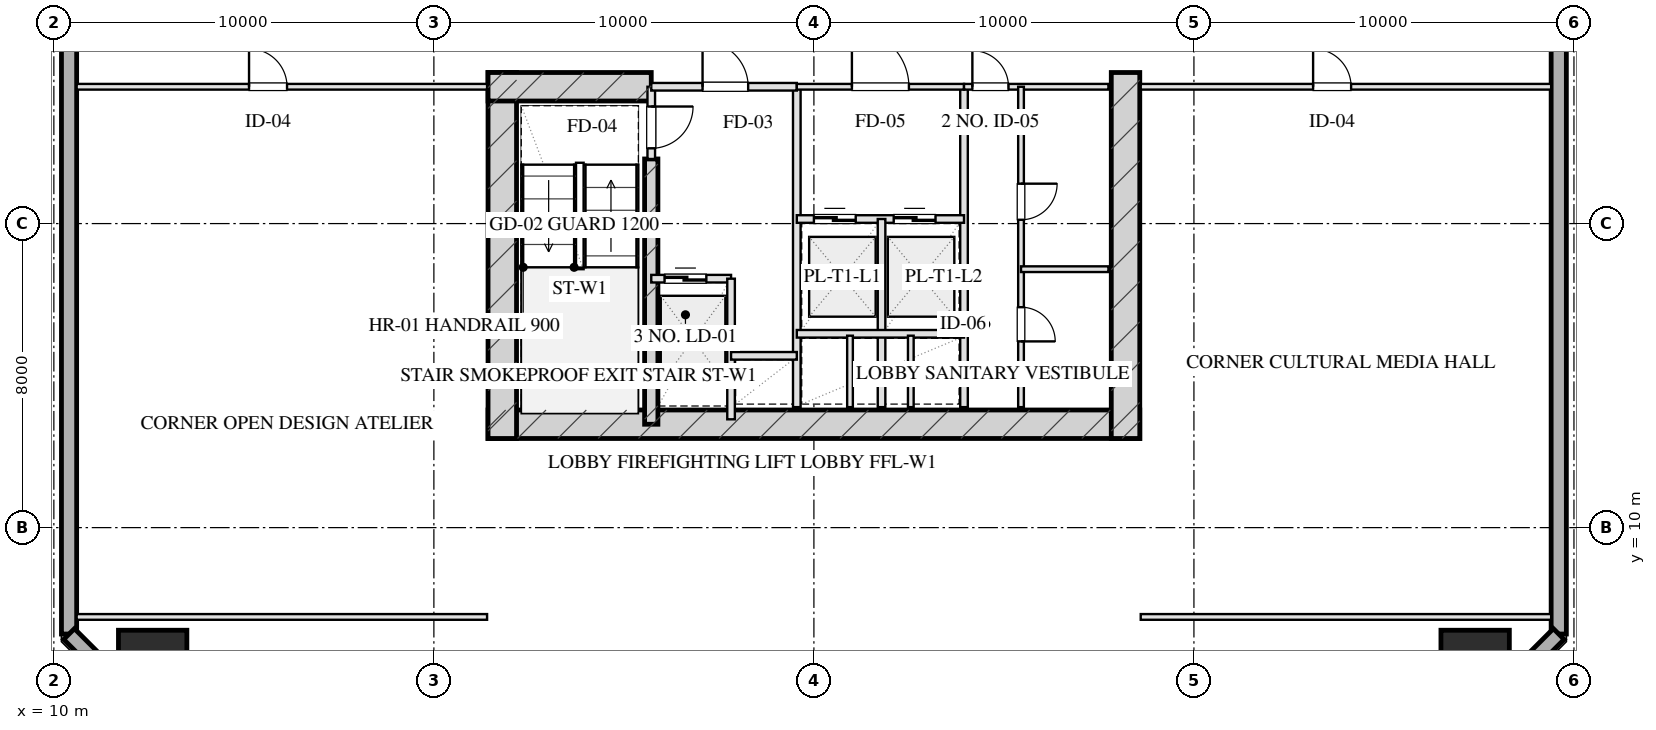
"""IFC4 building model, lengths in metres.
Left out: names, types, materials, properties, quantities, classifications, styles, units other than length and angle.
Written with IfcOpenShell. Run it as: python <this file> out.ifc"""

import sys

from ifc_helpers import new_model, si_unit, direction, frame, frame_2d, origin, origin_2d, place, context, subcontext, project, spatial, rectangle, hollow_rectangle, extrude, element, fill, save


model = new_model("IFC4")
c1 = context("Model", 3, precision=1e-05, world=origin(), true_north=direction((0.0, 1.0)))
c2 = subcontext(c1, "Body", "Model", "MODEL_VIEW")
j1 = project(units=[si_unit("LENGTHUNIT", "METRE"), si_unit("PLANEANGLEUNIT", "RADIAN")], contexts=[c1])
p1 = place(None, origin())
s1 = spatial("IfcSite", under=j1, at=p1, CompositionType="ELEMENT")
p2 = place(p1, origin())
s2 = spatial("IfcBuilding", under=s1, at=p2, CompositionType="ELEMENT")
p3 = place(p2, frame((0.0, 0.0, 74.75)))
s3 = spatial("IfcBuildingStorey", under=s2, at=p3, CompositionType="ELEMENT", Elevation=74.75)
p4 = place(p3, frame((21.425, 12.72, 0.0), z_axis=(0.0, 0.0, 1.0), x_axis=(1.0, 0.0, 0.0)))
e1 = element("IfcWall", 1, at=p4, inside=s3, PredefinedType="SHEAR", context=c2, shape_type="SweptSolid", body=[
    extrude(rectangle(XDim=17.15, YDim=0.75, at=frame_2d((8.575, 0.0))), origin(), (0.0, 0.0, 1.0), 3.45),
])
for number, where, z_axis, x_axis in (
    (2, (21.8, 21.975, 0.0), (0.0, 0.0, 1.0), (0.0, -1.0, 0.0)),
    (3, (38.2, 21.975, 0.0), (0.0, 0.0, 1.0), (0.0, -1.0, 0.0)),
):
    element("IfcWall", number, at=place(p3, frame(where, z_axis=z_axis, x_axis=x_axis)), inside=s3, PredefinedType="SHEAR", context=c2, shape_type="SweptSolid", body=[
        extrude(rectangle(XDim=9.63, YDim=0.75, at=frame_2d((4.815, 0.0))), origin(), (0.0, 0.0, 1.0), 3.45),
    ])
p5 = place(p3, frame((25.72, 19.7, 0.0), z_axis=(0.0, 0.0, 1.0), x_axis=(0.0, -1.0, 0.0)))
e4 = element("IfcWall", 4, at=p5, inside=s3, PredefinedType="SHEAR", context=c2, shape_type="SweptSolid", body=[
    extrude(rectangle(XDim=6.98, YDim=0.35, at=frame_2d((3.49, 0.0))), origin(), (0.0, 0.0, 1.0), 3.45),
])
p6 = place(p3, frame((21.425, 21.6, 0.0), z_axis=(0.0, 0.0, 1.0), x_axis=(1.0, 0.0, 0.0)))
e5 = element("IfcWall", 5, at=p6, inside=s3, PredefinedType="SHEAR", context=c2, shape_type="SweptSolid", body=[
    extrude(rectangle(XDim=4.295, YDim=0.75, at=frame_2d((2.147, 0.0))), origin(), (0.0, 0.0, 1.0), 3.45),
])
for number, where, z_axis, x_axis in (
    (6, (12.6, 6.4, 0.0), (0.0, 0.0, 1.0), (1.0, 0.0, 0.0)),
    (7, (47.4, 6.4, 0.0), (0.0, 0.0, 1.0), (1.0, 0.0, 0.0)),
):
    element("IfcColumn", number, at=place(p3, frame(where, z_axis=z_axis, x_axis=x_axis)), inside=s3, PredefinedType="COLUMN", context=c2, shape_type="SweptSolid", body=[
        extrude(hollow_rectangle(XDim=1.8, YDim=1.8, WallThickness=0.06, at=origin_2d()), origin(), (0.0, 0.0, 1.0), 3.451),
    ])
p7 = place(p3, frame((10.4, 7.2, 0.0), z_axis=(0.0, 0.0, 1.0), x_axis=(0.0, 1.0, 0.0)))
e8 = element("IfcWall", 8, at=p7, inside=s3, PredefinedType="SOLIDWALL", context=c2, shape_type="SweptSolid", body=[
    extrude(rectangle(XDim=53.6, YDim=0.4, at=frame_2d((26.8, 0.0))), origin(), (0.0, 0.0, 1.0), 2.61),
])
p8 = place(p7, frame((19.15, 0.0, 0.75)))
e9 = element("IfcOpeningElement", 9, at=p8, cuts=e8, PredefinedType="OPENING", context=c2, shape_type="SweptSolid", body=[
    extrude(rectangle(XDim=2.5, YDim=1.46, at=frame_2d((1.25, 0.73))), frame((0.0, 0.21, 0.0), z_axis=(0.0, -1.0, 0.0), x_axis=(1.0, 0.0, 0.0)), (0.0, 0.0, 1.0), 0.42),
])
p9 = place(p7, frame((28.15, 0.0, 0.75)))
e10 = element("IfcOpeningElement", 10, at=p9, cuts=e8, PredefinedType="OPENING", context=c2, shape_type="SweptSolid", body=[
    extrude(rectangle(XDim=2.5, YDim=1.46, at=frame_2d((1.25, 0.73))), frame((0.0, 0.21, 0.0), z_axis=(0.0, -1.0, 0.0), x_axis=(1.0, 0.0, 0.0)), (0.0, 0.0, 1.0), 0.42),
])
p10 = place(p7, frame((31.95, 0.0, 0.75)))
e11 = element("IfcOpeningElement", 11, at=p10, cuts=e8, PredefinedType="OPENING", context=c2, shape_type="SweptSolid", body=[
    extrude(rectangle(XDim=2.5, YDim=1.46, at=frame_2d((1.25, 0.73))), frame((0.0, 0.21, 0.0), z_axis=(0.0, -1.0, 0.0), x_axis=(1.0, 0.0, 0.0)), (0.0, 0.0, 1.0), 0.42),
])
p11 = place(p3, frame((49.6, 60.8, 0.0), z_axis=(0.0, 0.0, 1.0), x_axis=(0.0, -1.0, 0.0)))
e12 = element("IfcWall", 12, at=p11, inside=s3, PredefinedType="SOLIDWALL", context=c2, shape_type="SweptSolid", body=[
    extrude(rectangle(XDim=53.6, YDim=0.4, at=frame_2d((26.8, 0.0))), origin(), (0.0, 0.0, 1.0), 2.61),
])
for number, where, z_axis, x_axis in (
    (13, (49.6, 7.2, 0.0), (0.0, 0.0, 1.0), (-0.707, -0.707, 0.0)),
    (14, (13.4, 4.2, 0.0), (0.0, 0.0, 1.0), (-0.707, 0.707, 0.0)),
):
    element("IfcWall", number, at=place(p3, frame(where, z_axis=z_axis, x_axis=x_axis)), inside=s3, PredefinedType="SOLIDWALL", context=c2, shape_type="SweptSolid", body=[
        extrude(rectangle(XDim=4.243, YDim=0.4, at=frame_2d((2.121, 0.0))), origin(), (0.0, 0.0, 1.0), 2.61),
    ])
p12 = place(p3, frame((25.72, 21.6, 0.0), z_axis=(0.0, 0.0, 1.0), x_axis=(0.0, -1.0, 0.0)))
e15 = element("IfcWall", 15, at=p12, inside=s3, PredefinedType="PARTITIONING", context=c2, shape_type="SweptSolid", body=[
    extrude(rectangle(XDim=1.9, YDim=0.2, at=frame_2d((0.95, 0.0))), origin(), (0.0, 0.0, 1.0), 3.175),
])
p13 = place(p12, frame((0.52, 0.0, 0.0)))
e16 = element("IfcOpeningElement", 16, at=p13, cuts=e15, PredefinedType="OPENING", context=c2, shape_type="SweptSolid", body=[
    extrude(rectangle(XDim=1.1, YDim=2.05, at=frame_2d((0.55, 1.025))), frame((0.0, 0.11, 0.0), z_axis=(0.0, -1.0, 0.0), x_axis=(1.0, 0.0, 0.0)), (0.0, 0.0, 1.0), 0.22),
])
p14 = place(p3, frame((29.55, 21.6, 0.0), z_axis=(0.0, 0.0, 1.0), x_axis=(0.0, -1.0, 0.0)))
e17 = element("IfcWall", 17, at=p14, inside=s3, PredefinedType="PARTITIONING", context=c2, shape_type="SweptSolid", body=[
    extrude(rectangle(XDim=8.43, YDim=0.2, at=frame_2d((4.215, 0.0))), origin(), (0.0, 0.0, 1.0), 3.175),
])
p15 = place(p3, frame((25.72, 21.6, 0.0), z_axis=(0.0, 0.0, 1.0), x_axis=(1.0, 0.0, 0.0)))
e18 = element("IfcWall", 18, at=p15, inside=s3, PredefinedType="PARTITIONING", context=c2, shape_type="SweptSolid", body=[
    extrude(rectangle(XDim=3.83, YDim=0.2, at=frame_2d((1.915, 0.0))), origin(), (0.0, 0.0, 1.0), 3.175),
])
p16 = place(p15, frame((1.35, 0.0, 0.0)))
e19 = element("IfcOpeningElement", 19, at=p16, cuts=e18, PredefinedType="OPENING", context=c2, shape_type="SweptSolid", body=[
    extrude(rectangle(XDim=1.2, YDim=2.05, at=frame_2d((0.6, 1.025))), frame((0.0, 0.11, 0.0), z_axis=(0.0, -1.0, 0.0), x_axis=(1.0, 0.0, 0.0)), (0.0, 0.0, 1.0), 0.22),
])
p17 = place(p3, frame((25.72, 16.55, 0.0), z_axis=(0.0, 0.0, 1.0), x_axis=(1.0, 0.0, 0.0)))
e20 = element("IfcWall", 20, at=p17, inside=s3, PredefinedType="PARTITIONING", context=c2, shape_type="SweptSolid", body=[
    extrude(rectangle(XDim=2.1, YDim=0.2, at=frame_2d((1.05, 0.0))), origin(), (0.0, 0.0, 1.0), 3.175),
])
p18 = place(p17, frame((0.35, 0.0, 0.0)))
e21 = element("IfcOpeningElement", 21, at=p18, cuts=e20, PredefinedType="OPENING", context=c2, shape_type="SweptSolid", body=[
    extrude(rectangle(XDim=1.1, YDim=2.05, at=frame_2d((0.55, 1.025))), frame((0.0, 0.11, 0.0), z_axis=(0.0, -1.0, 0.0), x_axis=(1.0, 0.0, 0.0)), (0.0, 0.0, 1.0), 0.22),
])
p19 = place(p3, frame((27.82, 16.55, 0.0), z_axis=(0.0, 0.0, 1.0), x_axis=(0.0, -1.0, 0.0)))
e22 = element("IfcWall", 22, at=p19, inside=s3, PredefinedType="PARTITIONING", context=c2, shape_type="SweptSolid", body=[
    extrude(rectangle(XDim=3.7, YDim=0.2, at=frame_2d((1.85, 0.0))), origin(), (0.0, 0.0, 1.0), 3.175),
])
p20 = place(p3, frame((27.82, 14.52, 0.0), z_axis=(0.0, 0.0, 1.0), x_axis=(1.0, 0.0, 0.0)))
e23 = element("IfcWall", 23, at=p20, inside=s3, PredefinedType="PARTITIONING", context=c2, shape_type="SweptSolid", body=[
    extrude(rectangle(XDim=1.73, YDim=0.2, at=frame_2d((0.865, 0.0))), origin(), (0.0, 0.0, 1.0), 3.175),
])
p21 = place(p3, frame((33.95, 21.6, 0.0), z_axis=(0.0, 0.0, 1.0), x_axis=(0.0, -1.0, 0.0)))
e24 = element("IfcWall", 24, at=p21, inside=s3, PredefinedType="PARTITIONING", context=c2, shape_type="SweptSolid", body=[
    extrude(rectangle(XDim=8.43, YDim=0.2, at=frame_2d((4.215, 0.0))), origin(), (0.0, 0.0, 1.0), 3.175),
])
p22 = place(p3, frame((29.55, 21.6, 0.0), z_axis=(0.0, 0.0, 1.0), x_axis=(1.0, 0.0, 0.0)))
e25 = element("IfcWall", 25, at=p22, inside=s3, PredefinedType="PARTITIONING", context=c2, shape_type="SweptSolid", body=[
    extrude(rectangle(XDim=4.4, YDim=0.15, at=frame_2d((2.2, 0.0))), origin(), (0.0, 0.0, 1.0), 3.175),
])
p23 = place(p22, frame((1.45, 0.0, 0.0)))
e26 = element("IfcOpeningElement", 26, at=p23, cuts=e25, PredefinedType="OPENING", context=c2, shape_type="SweptSolid", body=[
    extrude(rectangle(XDim=1.5, YDim=2.05, at=frame_2d((0.75, 1.025))), frame((0.0, 0.085, 0.0), z_axis=(0.0, -1.0, 0.0), x_axis=(1.0, 0.0, 0.0)), (0.0, 0.0, 1.0), 0.17),
])
p24 = place(p3, frame((29.55, 18.12, 0.0), z_axis=(0.0, 0.0, 1.0), x_axis=(1.0, 0.0, 0.0)))
e27 = element("IfcWall", 27, at=p24, inside=s3, PredefinedType="PARTITIONING", context=c2, shape_type="SweptSolid", body=[
    extrude(rectangle(XDim=4.4, YDim=0.2, at=frame_2d((2.2, 0.0))), origin(), (0.0, 0.0, 1.0), 3.175),
])
p25 = place(p24, frame((0.45, 0.0, 0.0)))
e28 = element("IfcOpeningElement", 28, at=p25, cuts=e27, PredefinedType="OPENING", context=c2, shape_type="SweptSolid", body=[
    extrude(rectangle(XDim=1.1, YDim=2.05, at=frame_2d((0.55, 1.025))), frame((0.0, 0.11, 0.0), z_axis=(0.0, -1.0, 0.0), x_axis=(1.0, 0.0, 0.0)), (0.0, 0.0, 1.0), 0.22),
])
p26 = place(p24, frame((2.55, 0.0, 0.0)))
e29 = element("IfcOpeningElement", 29, at=p26, cuts=e27, PredefinedType="OPENING", context=c2, shape_type="SweptSolid", body=[
    extrude(rectangle(XDim=1.1, YDim=2.05, at=frame_2d((0.55, 1.025))), frame((0.0, 0.11, 0.0), z_axis=(0.0, -1.0, 0.0), x_axis=(1.0, 0.0, 0.0)), (0.0, 0.0, 1.0), 0.22),
])
p27 = place(p3, frame((31.78, 18.12, 0.0), z_axis=(0.0, 0.0, 1.0), x_axis=(0.0, -1.0, 0.0)))
e30 = element("IfcWall", 30, at=p27, inside=s3, PredefinedType="PARTITIONING", context=c2, shape_type="SweptSolid", body=[
    extrude(rectangle(XDim=4.95, YDim=0.2, at=frame_2d((2.475, 0.0))), origin(), (0.0, 0.0, 1.0), 3.175),
])
p28 = place(p3, frame((29.55, 15.1, 0.0), z_axis=(0.0, 0.0, 1.0), x_axis=(1.0, 0.0, 0.0)))
e31 = element("IfcWall", 31, at=p28, inside=s3, PredefinedType="PARTITIONING", context=c2, shape_type="SweptSolid", body=[
    extrude(rectangle(XDim=4.4, YDim=0.2, at=frame_2d((2.2, 0.0))), origin(), (0.0, 0.0, 1.0), 3.175),
])
for number, where, z_axis, x_axis in (
    (32, (30.95, 15.05, 0.0), (0.0, 0.0, 1.0), (0.0, -1.0, 0.0)),
    (33, (32.55, 15.05, 0.0), (0.0, 0.0, 1.0), (0.0, -1.0, 0.0)),
):
    element("IfcWall", number, at=place(p3, frame(where, z_axis=z_axis, x_axis=x_axis)), inside=s3, PredefinedType="PARTITIONING", context=c2, shape_type="SweptSolid", body=[
        extrude(rectangle(XDim=1.88, YDim=0.15, at=frame_2d((0.94, 0.0))), origin(), (0.0, 0.0, 1.0), 3.175),
    ])
p29 = place(p3, frame((33.95, 21.6, 0.0), z_axis=(0.0, 0.0, 1.0), x_axis=(1.0, 0.0, 0.0)))
e34 = element("IfcWall", 34, at=p29, inside=s3, PredefinedType="PARTITIONING", context=c2, shape_type="SweptSolid", body=[
    extrude(rectangle(XDim=3.8, YDim=0.15, at=frame_2d((1.9, 0.0))), origin(), (0.0, 0.0, 1.0), 3.175),
])
p30 = place(p29, frame((0.22, 0.0, 0.0)))
e35 = element("IfcOpeningElement", 35, at=p30, cuts=e34, PredefinedType="OPENING", context=c2, shape_type="SweptSolid", body=[
    extrude(rectangle(XDim=0.95, YDim=2.05, at=frame_2d((0.475, 1.025))), frame((0.0, 0.085, 0.0), z_axis=(0.0, -1.0, 0.0), x_axis=(1.0, 0.0, 0.0)), (0.0, 0.0, 1.0), 0.17),
])
p31 = place(p3, frame((35.45, 21.6, 0.0), z_axis=(0.0, 0.0, 1.0), x_axis=(0.0, -1.0, 0.0)))
e36 = element("IfcWall", 36, at=p31, inside=s3, PredefinedType="PARTITIONING", context=c2, shape_type="SweptSolid", body=[
    extrude(rectangle(XDim=8.43, YDim=0.15, at=frame_2d((4.215, 0.0))), origin(), (0.0, 0.0, 1.0), 2.765),
])
p32 = place(p31, frame((2.55, 0.0, 0.0)))
e37 = element("IfcOpeningElement", 37, at=p32, cuts=e36, PredefinedType="OPENING", context=c2, shape_type="SweptSolid", body=[
    extrude(rectangle(XDim=0.95, YDim=2.05, at=frame_2d((0.475, 1.025))), frame((0.0, 0.085, 0.0), z_axis=(0.0, -1.0, 0.0), x_axis=(1.0, 0.0, 0.0)), (0.0, 0.0, 1.0), 0.17),
])
p33 = place(p31, frame((5.8, 0.0, 0.0)))
e38 = element("IfcOpeningElement", 38, at=p33, cuts=e36, PredefinedType="OPENING", context=c2, shape_type="SweptSolid", body=[
    extrude(rectangle(XDim=0.9, YDim=2.05, at=frame_2d((0.45, 1.025))), frame((0.0, 0.085, 0.0), z_axis=(0.0, -1.0, 0.0), x_axis=(1.0, 0.0, 0.0)), (0.0, 0.0, 1.0), 0.17),
])
p34 = place(p3, frame((35.45, 16.8, 0.0), z_axis=(0.0, 0.0, 1.0), x_axis=(1.0, 0.0, 0.0)))
e39 = element("IfcWall", 39, at=p34, inside=s3, PredefinedType="PARTITIONING", context=c2, shape_type="SweptSolid", body=[
    extrude(rectangle(XDim=2.3, YDim=0.15, at=frame_2d((1.15, 0.0))), origin(), (0.0, 0.0, 1.0), 3.175),
])
p35 = place(p3, frame((10.6, 7.65, 0.0), z_axis=(0.0, 0.0, 1.0), x_axis=(1.0, 0.0, 0.0)))
e40 = element("IfcWall", 40, at=p35, inside=s3, PredefinedType="PARTITIONING", context=c2, shape_type="SweptSolid", body=[
    extrude(rectangle(XDim=10.8, YDim=0.15, at=frame_2d((5.4, 0.0))), origin(), (0.0, 0.0, 1.0), 3.175),
])
p36 = place(p3, frame((10.6, 21.6, 0.0), z_axis=(0.0, 0.0, 1.0), x_axis=(1.0, 0.0, 0.0)))
e41 = element("IfcWall", 41, at=p36, inside=s3, PredefinedType="PARTITIONING", context=c2, shape_type="SweptSolid", body=[
    extrude(rectangle(XDim=10.8, YDim=0.15, at=frame_2d((5.4, 0.0))), origin(), (0.0, 0.0, 1.0), 3.175),
])
p37 = place(p36, frame((4.536, 0.0, 0.0)))
e42 = element("IfcOpeningElement", 42, at=p37, cuts=e41, PredefinedType="OPENING", context=c2, shape_type="SweptSolid", body=[
    extrude(rectangle(XDim=1.0, YDim=2.05, at=frame_2d((0.5, 1.025))), frame((0.0, 0.085, 0.0), z_axis=(0.0, -1.0, 0.0), x_axis=(1.0, 0.0, 0.0)), (0.0, 0.0, 1.0), 0.17),
])
p38 = place(p3, frame((38.6, 7.65, 0.0), z_axis=(0.0, 0.0, 1.0), x_axis=(1.0, 0.0, 0.0)))
e43 = element("IfcWall", 43, at=p38, inside=s3, PredefinedType="PARTITIONING", context=c2, shape_type="SweptSolid", body=[
    extrude(rectangle(XDim=10.8, YDim=0.15, at=frame_2d((5.4, 0.0))), origin(), (0.0, 0.0, 1.0), 3.175),
])
p39 = place(p3, frame((38.6, 21.6, 0.0), z_axis=(0.0, 0.0, 1.0), x_axis=(1.0, 0.0, 0.0)))
e44 = element("IfcWall", 44, at=p39, inside=s3, PredefinedType="PARTITIONING", context=c2, shape_type="SweptSolid", body=[
    extrude(rectangle(XDim=10.8, YDim=0.15, at=frame_2d((5.4, 0.0))), origin(), (0.0, 0.0, 1.0), 3.175),
])
p40 = place(p39, frame((4.536, 0.0, 0.0)))
e45 = element("IfcOpeningElement", 45, at=p40, cuts=e44, PredefinedType="OPENING", context=c2, shape_type="SweptSolid", body=[
    extrude(rectangle(XDim=1.0, YDim=2.05, at=frame_2d((0.5, 1.025))), frame((0.0, 0.085, 0.0), z_axis=(0.0, -1.0, 0.0), x_axis=(1.0, 0.0, 0.0)), (0.0, 0.0, 1.0), 0.17),
])
p41 = place(p13, origin())
e46 = element("IfcDoor", 46, at=p41, inside=s3, OperationType="SINGLE_SWING_LEFT", PredefinedType="DOOR", context=c2, shape_type="SweptSolid", body=[
    extrude(rectangle(XDim=1.1, YDim=2.05, at=frame_2d((0.55, 1.025))), frame((0.0, 0.025, 0.0), z_axis=(0.0, -1.0, 0.0), x_axis=(1.0, 0.0, 0.0)), (0.0, 0.0, 1.0), 0.05),
])
fill(e16, e46)
p42 = place(p16, origin())
e47 = element("IfcDoor", 47, at=p42, inside=s3, OperationType="SINGLE_SWING_LEFT", PredefinedType="DOOR", context=c2, shape_type="SweptSolid", body=[
    extrude(rectangle(XDim=1.2, YDim=2.05, at=frame_2d((0.6, 1.025))), frame((0.0, 0.025, 0.0), z_axis=(0.0, -1.0, 0.0), x_axis=(1.0, 0.0, 0.0)), (0.0, 0.0, 1.0), 0.05),
])
fill(e19, e47)
p43 = place(p18, origin())
e48 = element("IfcDoor", 48, at=p43, inside=s3, OperationType="DOUBLE_DOOR_SLIDING", PredefinedType="DOOR", context=c2, shape_type="SweptSolid", body=[
    extrude(rectangle(XDim=1.1, YDim=2.05, at=frame_2d((0.55, 1.025))), frame((0.0, 0.025, 0.0), z_axis=(0.0, -1.0, 0.0), x_axis=(1.0, 0.0, 0.0)), (0.0, 0.0, 1.0), 0.05),
])
fill(e21, e48)
p44 = place(p23, origin())
e49 = element("IfcDoor", 49, at=p44, inside=s3, OperationType="SINGLE_SWING_LEFT", PredefinedType="DOOR", context=c2, shape_type="SweptSolid", body=[
    extrude(rectangle(XDim=1.5, YDim=2.05, at=frame_2d((0.75, 1.025))), frame((0.0, 0.025, 0.0), z_axis=(0.0, -1.0, 0.0), x_axis=(1.0, 0.0, 0.0)), (0.0, 0.0, 1.0), 0.05),
])
fill(e26, e49)
p45 = place(p25, origin())
e50 = element("IfcDoor", 50, at=p45, inside=s3, OperationType="DOUBLE_DOOR_SLIDING", PredefinedType="DOOR", context=c2, shape_type="SweptSolid", body=[
    extrude(rectangle(XDim=1.1, YDim=2.05, at=frame_2d((0.55, 1.025))), frame((0.0, 0.025, 0.0), z_axis=(0.0, -1.0, 0.0), x_axis=(1.0, 0.0, 0.0)), (0.0, 0.0, 1.0), 0.05),
])
fill(e28, e50)
p46 = place(p26, origin())
e51 = element("IfcDoor", 51, at=p46, inside=s3, OperationType="DOUBLE_DOOR_SLIDING", PredefinedType="DOOR", context=c2, shape_type="SweptSolid", body=[
    extrude(rectangle(XDim=1.1, YDim=2.05, at=frame_2d((0.55, 1.025))), frame((0.0, 0.025, 0.0), z_axis=(0.0, -1.0, 0.0), x_axis=(1.0, 0.0, 0.0)), (0.0, 0.0, 1.0), 0.05),
])
fill(e29, e51)
p47 = place(p30, origin())
e52 = element("IfcDoor", 52, at=p47, inside=s3, OperationType="SINGLE_SWING_LEFT", PredefinedType="DOOR", context=c2, shape_type="SweptSolid", body=[
    extrude(rectangle(XDim=0.95, YDim=2.05, at=frame_2d((0.475, 1.025))), frame((0.0, 0.025, 0.0), z_axis=(0.0, -1.0, 0.0), x_axis=(1.0, 0.0, 0.0)), (0.0, 0.0, 1.0), 0.05),
])
fill(e35, e52)
p48 = place(p32, origin())
e53 = element("IfcDoor", 53, at=p48, inside=s3, OperationType="SINGLE_SWING_LEFT", PredefinedType="DOOR", context=c2, shape_type="SweptSolid", body=[
    extrude(rectangle(XDim=0.95, YDim=2.05, at=frame_2d((0.475, 1.025))), frame((0.0, 0.025, 0.0), z_axis=(0.0, -1.0, 0.0), x_axis=(1.0, 0.0, 0.0)), (0.0, 0.0, 1.0), 0.05),
])
fill(e37, e53)
p49 = place(p33, origin())
e54 = element("IfcDoor", 54, at=p49, inside=s3, OperationType="SINGLE_SWING_RIGHT", PredefinedType="DOOR", context=c2, shape_type="SweptSolid", body=[
    extrude(rectangle(XDim=0.9, YDim=2.05, at=frame_2d((0.45, 1.025))), frame((0.0, 0.025, 0.0), z_axis=(0.0, -1.0, 0.0), x_axis=(1.0, 0.0, 0.0)), (0.0, 0.0, 1.0), 0.05),
])
fill(e38, e54)
p50 = place(p37, origin())
e55 = element("IfcDoor", 55, at=p50, inside=s3, OperationType="SINGLE_SWING_LEFT", PredefinedType="DOOR", context=c2, shape_type="SweptSolid", body=[
    extrude(rectangle(XDim=1.0, YDim=2.05, at=frame_2d((0.5, 1.025))), frame((0.0, 0.025, 0.0), z_axis=(0.0, -1.0, 0.0), x_axis=(1.0, 0.0, 0.0)), (0.0, 0.0, 1.0), 0.05),
])
fill(e42, e55)
p51 = place(p40, origin())
e56 = element("IfcDoor", 56, at=p51, inside=s3, OperationType="SINGLE_SWING_LEFT", PredefinedType="DOOR", context=c2, shape_type="SweptSolid", body=[
    extrude(rectangle(XDim=1.0, YDim=2.05, at=frame_2d((0.5, 1.025))), frame((0.0, 0.025, 0.0), z_axis=(0.0, -1.0, 0.0), x_axis=(1.0, 0.0, 0.0)), (0.0, 0.0, 1.0), 0.05),
])
fill(e45, e56)
save(model, sys.argv[1])
